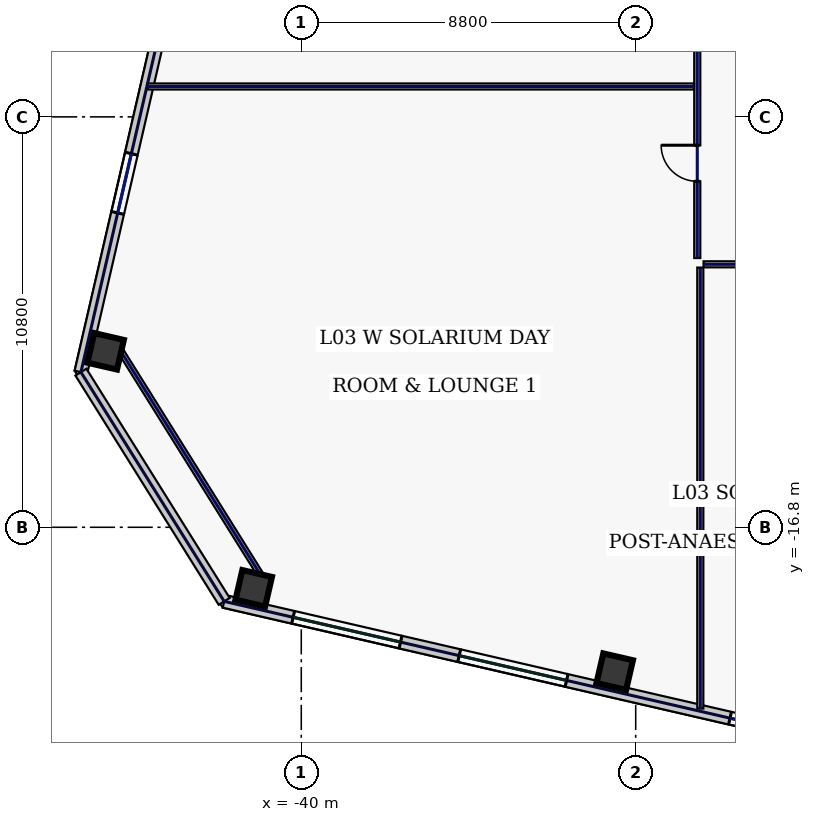
"""IFC4 building model, lengths in metres.
Left out: names, types, materials, properties, quantities, classifications, styles, units other than length and angle.
Written with IfcOpenShell. Run it as: python <this file> out.ifc"""

import sys

from ifc_helpers import new_model, si_unit, direction, frame, frame_2d, origin, origin_2d, place, context, subcontext, project, spatial, rectangle, hollow_rectangle, extrude, element, fill, save


model = new_model("IFC4")
c1 = context("Model", 3, precision=1e-05, world=origin(), true_north=direction((0.0, 1.0)))
c2 = subcontext(c1, "Body", "Model", "MODEL_VIEW")
j1 = project(units=[si_unit("LENGTHUNIT", "METRE"), si_unit("PLANEANGLEUNIT", "RADIAN")], contexts=[c1])
p1 = place(None, origin())
s1 = spatial("IfcSite", under=j1, at=p1, CompositionType="ELEMENT")
p2 = place(p1, origin())
s2 = spatial("IfcBuilding", under=s1, at=p2, CompositionType="ELEMENT")
p3 = place(p2, frame((0.0, 0.0, 18.4)))
s3 = spatial("IfcBuildingStorey", under=s2, at=p3, CompositionType="ELEMENT", Elevation=18.4)
for number, where, z_axis, x_axis in (
    (1, (-41.251, -18.406, 0.0), (0.0, 0.0, 1.0), (0.974, -0.225, 0.0)),
    (2, (-31.752, -20.599, 0.0), (0.0, 0.0, 1.0), (0.974, -0.225, 0.0)),
    (3, (-45.148, -12.169, 0.0), (0.0, 0.0, 1.0), (0.974, -0.225, 0.0)),
):
    element("IfcColumn", number, at=place(p3, frame(where, z_axis=z_axis, x_axis=x_axis)), inside=s3, PredefinedType="COLUMN", context=c2, shape_type="SweptSolid", body=[
        extrude(hollow_rectangle(XDim=0.8, YDim=0.8, WallThickness=0.036, at=origin_2d()), origin(), (0.0, 0.0, 1.0), 4.7),
    ])
p4 = place(p3, frame((-42.029, -18.75, 0.0), z_axis=(0.0, 0.0, 1.0), x_axis=(0.97436993772, -0.224951604723, 0.0)))
e4 = element("IfcWall", 4, at=p4, inside=s3, PredefinedType="STANDARD", context=c2, shape_type="SweptSolid", body=[
    extrude(rectangle(XDim=22.651, YDim=0.34, at=frame_2d((11.326, 0.0))), origin(), (0.0, 0.0, 1.0), 4.7),
])
p5 = place(p4, frame((1.862, 0.0, 0.85)))
e5 = element("IfcOpeningElement", 5, at=p5, cuts=e4, PredefinedType="OPENING", context=c2, shape_type="SweptSolid", body=[
    extrude(rectangle(XDim=2.9, YDim=2.3, at=frame_2d((1.45, 1.15))), frame((0.0, 0.18, 0.0), z_axis=(0.0, -1.0, 0.0), x_axis=(1.0, 0.0, 0.0)), (0.0, 0.0, 1.0), 0.36),
])
p6 = place(p4, frame((6.346, 0.0, 0.85)))
e6 = element("IfcOpeningElement", 6, at=p6, cuts=e4, PredefinedType="OPENING", context=c2, shape_type="SweptSolid", body=[
    extrude(rectangle(XDim=2.9, YDim=2.3, at=frame_2d((1.45, 1.15))), frame((0.0, 0.18, 0.0), z_axis=(0.0, -1.0, 0.0), x_axis=(1.0, 0.0, 0.0)), (0.0, 0.0, 1.0), 0.36),
])
p7 = place(p4, frame((13.661, 0.0, 0.85)))
e7 = element("IfcOpeningElement", 7, at=p7, cuts=e4, PredefinedType="OPENING", context=c2, shape_type="SweptSolid", body=[
    extrude(rectangle(XDim=0.85, YDim=1.85, at=frame_2d((0.425, 0.925))), frame((0.0, 0.18, 0.0), z_axis=(0.0, -1.0, 0.0), x_axis=(1.0, 0.0, 0.0)), (0.0, 0.0, 1.0), 0.36),
])
p8 = place(p4, frame((16.095, 0.0, 0.85)))
e8 = element("IfcOpeningElement", 8, at=p8, cuts=e4, PredefinedType="OPENING", context=c2, shape_type="SweptSolid", body=[
    extrude(rectangle(XDim=0.85, YDim=1.85, at=frame_2d((0.425, 0.925))), frame((0.0, 0.18, 0.0), z_axis=(0.0, -1.0, 0.0), x_axis=(1.0, 0.0, 0.0)), (0.0, 0.0, 1.0), 0.36),
])
p9 = place(p3, frame((-36.62, 27.037, 0.0), z_axis=(0.0, 0.0, 1.0), x_axis=(-0.224951280646, -0.974370012539, 0.0)))
e9 = element("IfcWall", 9, at=p9, inside=s3, PredefinedType="STANDARD", context=c2, shape_type="SweptSolid", body=[
    extrude(rectangle(XDim=40.8, YDim=0.34, at=frame_2d((20.4, 0.0))), origin(), (0.0, 0.0, 1.0), 4.7),
])
p10 = place(p9, frame((4.3, 0.0, 0.58)))
e10 = element("IfcOpeningElement", 10, at=p10, cuts=e9, PredefinedType="OPENING", context=c2, shape_type="SweptSolid", body=[
    extrude(rectangle(XDim=1.6, YDim=2.3, at=frame_2d((0.8, 1.15))), frame((0.0, 0.18, 0.0), z_axis=(0.0, -1.0, 0.0), x_axis=(1.0, 0.0, 0.0)), (0.0, 0.0, 1.0), 0.36),
])
p11 = place(p9, frame((14.5, 0.0, 0.58)))
e11 = element("IfcOpeningElement", 11, at=p11, cuts=e9, PredefinedType="OPENING", context=c2, shape_type="SweptSolid", body=[
    extrude(rectangle(XDim=1.6, YDim=2.3, at=frame_2d((0.8, 1.15))), frame((0.0, 0.18, 0.0), z_axis=(0.0, -1.0, 0.0), x_axis=(1.0, 0.0, 0.0)), (0.0, 0.0, 1.0), 0.36),
])
p12 = place(p9, frame((24.7, 0.0, 0.58)))
e12 = element("IfcOpeningElement", 12, at=p12, cuts=e9, PredefinedType="OPENING", context=c2, shape_type="SweptSolid", body=[
    extrude(rectangle(XDim=1.6, YDim=2.3, at=frame_2d((0.8, 1.15))), frame((0.0, 0.18, 0.0), z_axis=(0.0, -1.0, 0.0), x_axis=(1.0, 0.0, 0.0)), (0.0, 0.0, 1.0), 0.36),
])
p13 = place(p9, frame((34.9, 0.0, 0.58)))
e13 = element("IfcOpeningElement", 13, at=p13, cuts=e9, PredefinedType="OPENING", context=c2, shape_type="SweptSolid", body=[
    extrude(rectangle(XDim=1.6, YDim=2.3, at=frame_2d((0.8, 1.15))), frame((0.0, 0.18, 0.0), z_axis=(0.0, -1.0, 0.0), x_axis=(1.0, 0.0, 0.0)), (0.0, 0.0, 1.0), 0.36),
])
p14 = place(p3, frame((-45.798, -12.717, 0.0), z_axis=(0.0, 0.0, 1.0), x_axis=(0.529906387556, -0.848056142261, 0.0)))
e14 = element("IfcWall", 14, at=p14, inside=s3, PredefinedType="STANDARD", context=c2, shape_type="SweptSolid", body=[
    extrude(rectangle(XDim=7.114, YDim=0.34, at=frame_2d((3.557, 0.0))), origin(), (0.0, 0.0, 1.0), 4.7),
])
p15 = place(p3, frame((-44.86, -11.989, 0.0), z_axis=(0.0, 0.0, 1.0), x_axis=(0.52991239767, -0.848052386823, 0.0)))
e15 = element("IfcWall", 15, at=p15, inside=s3, PredefinedType="PARTITIONING", context=c2, shape_type="SweptSolid", body=[
    extrude(rectangle(XDim=7.354, YDim=0.16, at=frame_2d((3.677, 0.0))), origin(), (0.0, 0.0, 1.0), 4.7),
])
p16 = place(p3, frame((-29.58, -9.715, 0.0), z_axis=(0.0, 0.0, 1.0), x_axis=(0.0, 1.0, 0.0)))
e16 = element("IfcWall", 16, at=p16, inside=s3, PredefinedType="PARTITIONING", context=c2, shape_type="SweptSolid", body=[
    extrude(rectangle(XDim=19.43, YDim=0.16, at=frame_2d((9.715, 0.0))), origin(), (0.0, 0.0, 1.0), 4.7),
])
p17 = place(p16, frame((2.019, 0.0, 0.0)))
e17 = element("IfcOpeningElement", 17, at=p17, cuts=e16, PredefinedType="OPENING", context=c2, shape_type="SweptSolid", body=[
    extrude(rectangle(XDim=0.95, YDim=2.2, at=frame_2d((0.475, 1.1))), frame((0.0, 0.09, 0.0), z_axis=(0.0, -1.0, 0.0), x_axis=(1.0, 0.0, 0.0)), (0.0, 0.0, 1.0), 0.18),
])
p18 = place(p16, frame((6.725, 0.0, 0.0)))
e18 = element("IfcOpeningElement", 18, at=p18, cuts=e16, PredefinedType="OPENING", context=c2, shape_type="SweptSolid", body=[
    extrude(rectangle(XDim=0.95, YDim=2.2, at=frame_2d((0.475, 1.1))), frame((0.0, 0.09, 0.0), z_axis=(0.0, -1.0, 0.0), x_axis=(1.0, 0.0, 0.0)), (0.0, 0.0, 1.0), 0.18),
])
p19 = place(p16, frame((11.925, 0.0, 0.0)))
e19 = element("IfcOpeningElement", 19, at=p19, cuts=e16, PredefinedType="OPENING", context=c2, shape_type="SweptSolid", body=[
    extrude(rectangle(XDim=0.95, YDim=2.2, at=frame_2d((0.475, 1.1))), frame((0.0, 0.09, 0.0), z_axis=(0.0, -1.0, 0.0), x_axis=(1.0, 0.0, 0.0)), (0.0, 0.0, 1.0), 0.18),
])
p20 = place(p16, frame((16.631, 0.0, 0.0)))
e20 = element("IfcOpeningElement", 20, at=p20, cuts=e16, PredefinedType="OPENING", context=c2, shape_type="SweptSolid", body=[
    extrude(rectangle(XDim=0.95, YDim=2.2, at=frame_2d((0.475, 1.1))), frame((0.0, 0.09, 0.0), z_axis=(0.0, -1.0, 0.0), x_axis=(1.0, 0.0, 0.0)), (0.0, 0.0, 1.0), 0.18),
])
p21 = place(p3, frame((-6.915, -9.88, 0.0), z_axis=(0.0, 0.0, 1.0), x_axis=(-1.0, 0.0, 0.0)))
e21 = element("IfcWall", 21, at=p21, inside=s3, PredefinedType="PARTITIONING", context=c2, shape_type="SweptSolid", body=[
    extrude(rectangle(XDim=22.5, YDim=0.16, at=frame_2d((11.25, 0.0))), origin(), (0.0, 0.0, 1.0), 4.7),
])
p22 = place(p21, frame((19.501, 0.0, 0.0)))
e22 = element("IfcOpeningElement", 22, at=p22, cuts=e21, PredefinedType="OPENING", context=c2, shape_type="SweptSolid", body=[
    extrude(rectangle(XDim=1.3, YDim=2.2, at=frame_2d((0.65, 1.1))), frame((0.0, 0.09, 0.0), z_axis=(0.0, -1.0, 0.0), x_axis=(1.0, 0.0, 0.0)), (0.0, 0.0, 1.0), 0.18),
])
p23 = place(p21, frame((14.22, 0.0, 0.0)))
e23 = element("IfcOpeningElement", 23, at=p23, cuts=e21, PredefinedType="OPENING", context=c2, shape_type="SweptSolid", body=[
    extrude(rectangle(XDim=0.95, YDim=2.2, at=frame_2d((0.475, 1.1))), frame((0.0, 0.09, 0.0), z_axis=(0.0, -1.0, 0.0), x_axis=(1.0, 0.0, 0.0)), (0.0, 0.0, 1.0), 0.18),
])
p24 = place(p21, frame((7.495, 0.0, 0.0)))
e24 = element("IfcOpeningElement", 24, at=p24, cuts=e21, PredefinedType="OPENING", context=c2, shape_type="SweptSolid", body=[
    extrude(rectangle(XDim=0.95, YDim=2.2, at=frame_2d((0.475, 1.1))), frame((0.0, 0.09, 0.0), z_axis=(0.0, -1.0, 0.0), x_axis=(1.0, 0.0, 0.0)), (0.0, 0.0, 1.0), 0.18),
])
p25 = place(p3, frame((-29.5, -21.571, 0.0), z_axis=(0.0, 0.0, 1.0), x_axis=(0.0, 1.0, 0.0)))
e25 = element("IfcWall", 25, at=p25, inside=s3, PredefinedType="PARTITIONING", context=c2, shape_type="SweptSolid", body=[
    extrude(rectangle(XDim=11.605, YDim=0.16, at=frame_2d((5.803, 0.0))), origin(), (0.0, 0.0, 1.0), 4.7),
])
p26 = place(p3, frame((-44.042, -5.2, 0.0), z_axis=(0.0, 0.0, 1.0), x_axis=(1.0, 0.0, 0.0)))
e26 = element("IfcWall", 26, at=p26, inside=s3, PredefinedType="PARTITIONING", context=c2, shape_type="SweptSolid", body=[
    extrude(rectangle(XDim=14.377, YDim=0.16, at=frame_2d((7.188, 0.0))), origin(), (0.0, 0.0, 1.0), 4.7),
])
p27 = place(p5, origin())
e27 = element("IfcWindow", 27, at=p27, inside=s3, PartitioningType="SINGLE_PANEL", PredefinedType="WINDOW", context=c2, shape_type="SweptSolid", body=[
    extrude(rectangle(XDim=2.9, YDim=2.3, at=frame_2d((1.45, 1.15))), frame((0.0, 0.03, 0.0), z_axis=(0.0, -1.0, 0.0), x_axis=(1.0, 0.0, 0.0)), (0.0, 0.0, 1.0), 0.06),
])
fill(e5, e27)
p28 = place(p6, origin())
e28 = element("IfcWindow", 28, at=p28, inside=s3, PartitioningType="SINGLE_PANEL", PredefinedType="WINDOW", context=c2, shape_type="SweptSolid", body=[
    extrude(rectangle(XDim=2.9, YDim=2.3, at=frame_2d((1.45, 1.15))), frame((0.0, 0.03, 0.0), z_axis=(0.0, -1.0, 0.0), x_axis=(1.0, 0.0, 0.0)), (0.0, 0.0, 1.0), 0.06),
])
fill(e6, e28)
p29 = place(p7, origin())
e29 = element("IfcWindow", 29, at=p29, inside=s3, PartitioningType="SINGLE_PANEL", PredefinedType="WINDOW", context=c2, shape_type="SweptSolid", body=[
    extrude(rectangle(XDim=0.85, YDim=1.85, at=frame_2d((0.425, 0.925))), frame((0.0, 0.03, 0.0), z_axis=(0.0, -1.0, 0.0), x_axis=(1.0, 0.0, 0.0)), (0.0, 0.0, 1.0), 0.06),
])
fill(e7, e29)
p30 = place(p13, origin())
e30 = element("IfcWindow", 30, at=p30, inside=s3, PartitioningType="SINGLE_PANEL", PredefinedType="WINDOW", context=c2, shape_type="SweptSolid", body=[
    extrude(rectangle(XDim=1.6, YDim=2.3, at=frame_2d((0.8, 1.15))), frame((0.0, 0.03, 0.0), z_axis=(0.0, -1.0, 0.0), x_axis=(1.0, 0.0, 0.0)), (0.0, 0.0, 1.0), 0.06),
])
fill(e13, e30)
p31 = place(p17, origin())
e31 = element("IfcDoor", 31, at=p31, inside=s3, OperationType="SINGLE_SWING_RIGHT", PredefinedType="DOOR", context=c2, shape_type="SweptSolid", body=[
    extrude(rectangle(XDim=0.95, YDim=2.2, at=frame_2d((0.475, 1.1))), frame((0.0, 0.025, 0.0), z_axis=(0.0, -1.0, 0.0), x_axis=(1.0, 0.0, 0.0)), (0.0, 0.0, 1.0), 0.05),
])
fill(e17, e31)
save(model, sys.argv[1])
